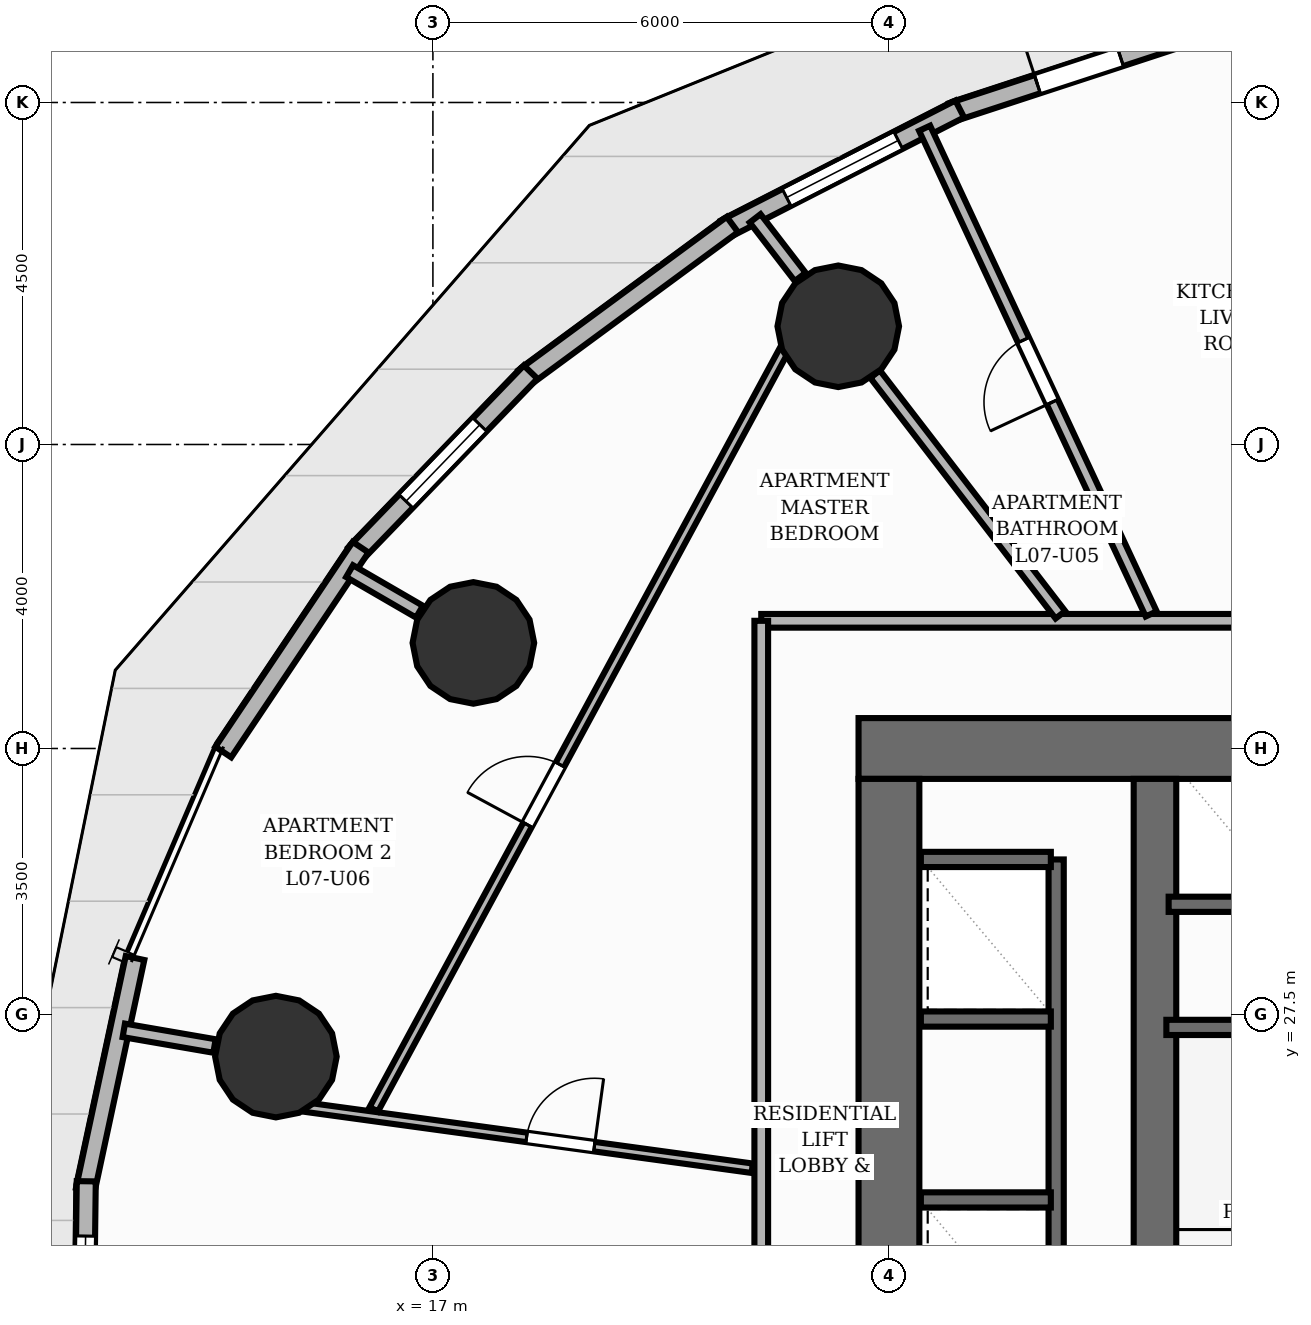
"""IFC4 building model, lengths in metres.
Left out: names, types, materials, properties, quantities, classifications, styles, units other than length and angle.
Written with IfcOpenShell. Run it as: python <this file> out.ifc"""

import sys

from ifc_helpers import new_model, si_unit, direction, frame, frame_2d, origin, origin_2d, place, context, subcontext, project, spatial, rectangle, circle, extrude, element, fill, save


model = new_model("IFC4")
c1 = context("Model", 3, precision=1e-05, world=origin(), true_north=direction((0.0, 1.0)))
c2 = subcontext(c1, "Body", "Model", "MODEL_VIEW")
j1 = project(units=[si_unit("LENGTHUNIT", "METRE"), si_unit("PLANEANGLEUNIT", "RADIAN")], contexts=[c1])
p1 = place(None, origin())
s1 = spatial("IfcSite", under=j1, at=p1, CompositionType="ELEMENT")
p2 = place(p1, origin())
s2 = spatial("IfcBuilding", under=s1, at=p2, CompositionType="ELEMENT")
p3 = place(p2, frame((0.0, 0.0, 28.0)))
s3 = spatial("IfcBuildingStorey", under=s2, at=p3, CompositionType="ELEMENT", Elevation=28.0)
p4 = place(p3, frame((22.6, 31.0, 0.0), z_axis=(0.0, 0.0, 1.0), x_axis=(1.0, 0.0, 0.0)))
e1 = element("IfcWall", 1, at=p4, inside=s3, PredefinedType="SHEAR", context=c2, shape_type="SweptSolid", body=[
    extrude(rectangle(XDim=18.8, YDim=0.8, at=frame_2d((9.4, 0.0))), origin(), (0.0, 0.0, 1.0), 3.2),
])
p5 = place(p4, frame((11.8, 0.0, 0.0)))
e2 = element("IfcOpeningElement", 2, at=p5, cuts=e1, PredefinedType="OPENING", context=c2, shape_type="SweptSolid", body=[
    extrude(rectangle(XDim=1.1, YDim=2.15, at=frame_2d((0.55, 1.075))), frame((0.0, 0.41, 0.0), z_axis=(0.0, -1.0, 0.0), x_axis=(1.0, 0.0, 0.0)), (0.0, 0.0, 1.0), 0.82),
])
p6 = place(p3, frame((23.0, 17.4, 0.0), z_axis=(0.0, 0.0, 1.0), x_axis=(0.0, 1.0, 0.0)))
e3 = element("IfcWall", 3, at=p6, inside=s3, PredefinedType="SHEAR", context=c2, shape_type="SweptSolid", body=[
    extrude(rectangle(XDim=13.2, YDim=0.8, at=frame_2d((6.6, 0.0))), origin(), (0.0, 0.0, 1.0), 3.2),
])
p7 = place(p3, frame((26.5, 17.4, 0.0), z_axis=(0.0, 0.0, 1.0), x_axis=(0.0, 1.0, 0.0)))
e4 = element("IfcWall", 4, at=p7, inside=s3, PredefinedType="SHEAR", context=c2, shape_type="SweptSolid", body=[
    extrude(rectangle(XDim=13.2, YDim=0.56, at=frame_2d((6.6, 0.0))), origin(), (0.0, 0.0, 1.0), 3.2),
])
for number, where, z_axis, x_axis in (
    (5, (22.333, 36.555, 0.0), (0.0, 0.0, 1.0), (1.0, 0.0, 0.0)),
    (6, (17.532, 32.389, 0.0), (0.0, 0.0, 1.0), (1.0, 0.0, 0.0)),
    (7, (14.934, 26.946, 0.0), (0.0, 0.0, 1.0), (1.0, 0.0, 0.0)),
):
    element("IfcColumn", number, at=place(p3, frame(where, z_axis=z_axis, x_axis=x_axis)), inside=s3, PredefinedType="COLUMN", context=c2, shape_type="SweptSolid", body=[
        extrude(circle(Radius=0.8, at=origin_2d()), origin(), (0.0, 0.0, 1.0), 3.2),
    ])
p8 = place(p3, frame((23.831, 39.373, 0.0), z_axis=(0.0, 0.0, 1.0), x_axis=(0.950290237418, 0.311365484066, 0.0)))
e8 = element("IfcWall", 8, at=p8, inside=s3, PredefinedType="SOLIDWALL", context=c2, shape_type="SweptSolid", body=[
    extrude(rectangle(XDim=3.513, YDim=0.25, at=frame_2d((1.756, 0.0))), origin(), (0.0, 0.0, 1.0), 2.96),
])
p9 = place(p8, frame((1.181, 0.0, 0.0)))
e9 = element("IfcOpeningElement", 9, at=p9, cuts=e8, PredefinedType="OPENING", context=c2, shape_type="SweptSolid", body=[
    extrude(rectangle(XDim=1.15, YDim=2.2, at=frame_2d((0.575, 1.1))), frame((0.0, 0.135, 0.0), z_axis=(0.0, -1.0, 0.0), x_axis=(1.0, 0.0, 0.0)), (0.0, 0.0, 1.0), 0.27),
])
p10 = place(p3, frame((20.847, 37.836, 0.0), z_axis=(0.0, 0.0, 1.0), x_axis=(0.890260122421, 0.455452428281, 0.0)))
e10 = element("IfcWall", 10, at=p10, inside=s3, PredefinedType="SOLIDWALL", context=c2, shape_type="SweptSolid", body=[
    extrude(rectangle(XDim=3.465, YDim=0.25, at=frame_2d((1.732, 0.0))), origin(), (0.0, 0.0, 1.0), 2.96),
])
p11 = place(p10, frame((0.907, 0.0, 0.85)))
e11 = element("IfcOpeningElement", 11, at=p11, cuts=e10, PredefinedType="OPENING", context=c2, shape_type="SweptSolid", body=[
    extrude(rectangle(XDim=1.65, YDim=1.55, at=frame_2d((0.825, 0.775))), frame((0.0, 0.135, 0.0), z_axis=(0.0, -1.0, 0.0), x_axis=(1.0, 0.0, 0.0)), (0.0, 0.0, 1.0), 0.27),
])
p12 = place(p3, frame((18.202, 35.88, 0.0), z_axis=(0.0, 0.0, 1.0), x_axis=(0.805405938507, 0.592723606935, 0.0)))
e12 = element("IfcWall", 12, at=p12, inside=s3, PredefinedType="SOLIDWALL", context=c2, shape_type="SweptSolid", body=[
    extrude(rectangle(XDim=3.399, YDim=0.25, at=frame_2d((1.699, 0.0))), origin(), (0.0, 0.0, 1.0), 2.96),
])
p13 = place(p3, frame((15.979, 33.562, 0.0), z_axis=(0.0, 0.0, 1.0), x_axis=(0.694392538781, 0.719596416115, 0.0)))
e13 = element("IfcWall", 13, at=p13, inside=s3, PredefinedType="SOLIDWALL", context=c2, shape_type="SweptSolid", body=[
    extrude(rectangle(XDim=3.323, YDim=0.25, at=frame_2d((1.661, 0.0))), origin(), (0.0, 0.0, 1.0), 2.96),
])
p14 = place(p13, frame((0.961, 0.0, 0.85)))
e14 = element("IfcOpeningElement", 14, at=p14, cuts=e13, PredefinedType="OPENING", context=c2, shape_type="SweptSolid", body=[
    extrude(rectangle(XDim=1.4, YDim=1.55, at=frame_2d((0.7, 0.775))), frame((0.0, 0.135, 0.0), z_axis=(0.0, -1.0, 0.0), x_axis=(1.0, 0.0, 0.0)), (0.0, 0.0, 1.0), 0.27),
])
p15 = place(p3, frame((14.242, 30.953, 0.0), z_axis=(0.0, 0.0, 1.0), x_axis=(0.556764929833, 0.83067009872, 0.0)))
e15 = element("IfcWall", 15, at=p15, inside=s3, PredefinedType="SOLIDWALL", context=c2, shape_type="SweptSolid", body=[
    extrude(rectangle(XDim=3.244, YDim=0.25, at=frame_2d((1.622, 0.0))), origin(), (0.0, 0.0, 1.0), 2.96),
])
p16 = place(p3, frame((12.427, 25.192, 0.0), z_axis=(0.0, 0.0, 1.0), x_axis=(0.209668000253, 0.977772637002, 0.0)))
e16 = element("IfcWall", 16, at=p16, inside=s3, PredefinedType="SOLIDWALL", context=c2, shape_type="SweptSolid", body=[
    extrude(rectangle(XDim=3.121, YDim=0.25, at=frame_2d((1.56, 0.0))), origin(), (0.0, 0.0, 1.0), 2.96),
])
p17 = place(p3, frame((12.401, 22.214, 0.0), z_axis=(0.0, 0.0, 1.0), x_axis=(0.012397373015, 0.999923149618, 0.0)))
e17 = element("IfcWall", 17, at=p17, inside=s3, PredefinedType="SOLIDWALL", context=c2, shape_type="SweptSolid", body=[
    extrude(rectangle(XDim=3.092, YDim=0.25, at=frame_2d((1.546, 0.0))), origin(), (0.0, 0.0, 1.0), 2.96),
])
p18 = place(p17, frame((0.721, 0.0, 0.85)))
e18 = element("IfcOpeningElement", 18, at=p18, cuts=e17, PredefinedType="OPENING", context=c2, shape_type="SweptSolid", body=[
    extrude(rectangle(XDim=1.65, YDim=1.55, at=frame_2d((0.825, 0.775))), frame((0.0, 0.135, 0.0), z_axis=(0.0, -1.0, 0.0), x_axis=(1.0, 0.0, 0.0)), (0.0, 0.0, 1.0), 0.27),
])
p19 = place(p3, frame((26.65, 27.33, 0.0), z_axis=(0.0, 0.0, 1.0), x_axis=(1.0, 0.0, 0.0)))
e19 = element("IfcWall", 19, at=p19, inside=s3, PredefinedType="SHEAR", context=c2, shape_type="SweptSolid", body=[
    extrude(rectangle(XDim=3.24, YDim=0.2, at=frame_2d((1.62, 0.0))), origin(), (0.0, 0.0, 1.0), 3.2),
])
p20 = place(p3, frame((25.2, 18.46, 0.0), z_axis=(0.0, 0.0, 1.0), x_axis=(0.0, 1.0, 0.0)))
e20 = element("IfcWall", 20, at=p20, inside=s3, PredefinedType="SHEAR", context=c2, shape_type="SweptSolid", body=[
    extrude(rectangle(XDim=11.08, YDim=0.2, at=frame_2d((5.54, 0.0))), origin(), (0.0, 0.0, 1.0), 3.2),
])
for number, where, z_axis, x_axis in (
    (21, (23.42, 29.54, 0.0), (0.0, 0.0, 1.0), (1.0, 0.0, 0.0)),
    (22, (23.42, 25.06, 0.0), (0.0, 0.0, 1.0), (1.0, 0.0, 0.0)),
    (23, (23.42, 27.44, 0.0), (0.0, 0.0, 1.0), (1.0, 0.0, 0.0)),
):
    element("IfcWall", number, at=place(p3, frame(where, z_axis=z_axis, x_axis=x_axis)), inside=s3, PredefinedType="SHEAR", context=c2, shape_type="SweptSolid", body=[
        extrude(rectangle(XDim=1.71, YDim=0.2, at=frame_2d((0.855, 0.0))), origin(), (0.0, 0.0, 1.0), 3.2),
    ])
p21 = place(p3, frame((26.68, 28.95, 0.0), z_axis=(0.0, 0.0, 1.0), x_axis=(1.0, 0.0, 0.0)))
e24 = element("IfcWall", 24, at=p21, inside=s3, PredefinedType="SHEAR", context=c2, shape_type="SweptSolid", body=[
    extrude(rectangle(XDim=5.24, YDim=0.2, at=frame_2d((2.62, 0.0))), origin(), (0.0, 0.0, 1.0), 3.2),
])
p22 = place(p3, frame((21.833, 37.205, 0.0), z_axis=(0.0, 0.0, 1.0), x_axis=(-0.609953343804, 0.792437327732, 0.0)))
e25 = element("IfcWall", 25, at=p22, inside=s3, PredefinedType="PARTITIONING", context=c2, shape_type="SweptSolid", body=[
    extrude(rectangle(XDim=0.973, YDim=0.18, at=frame_2d((0.486, 0.0))), origin(), (0.0, 0.0, 1.0), 2.178),
])
p23 = place(p3, frame((16.823, 32.8, 0.0), z_axis=(0.0, 0.0, 1.0), x_axis=(-0.865001274409, 0.501769663562, 0.0)))
e26 = element("IfcWall", 26, at=p23, inside=s3, PredefinedType="PARTITIONING", context=c2, shape_type="SweptSolid", body=[
    extrude(rectangle(XDim=1.063, YDim=0.18, at=frame_2d((0.531, 0.0))), origin(), (0.0, 0.0, 1.0), 2.178),
])
p24 = place(p3, frame((14.126, 27.085, 0.0), z_axis=(0.0, 0.0, 1.0), x_axis=(-0.985412344637, 0.170183756676, 0.0)))
e27 = element("IfcWall", 27, at=p24, inside=s3, PredefinedType="PARTITIONING", context=c2, shape_type="SweptSolid", body=[
    extrude(rectangle(XDim=1.211, YDim=0.18, at=frame_2d((0.605, 0.0))), origin(), (0.0, 0.0, 1.0), 2.178),
])
p25 = place(p3, frame((21.32, 32.68, 0.0), z_axis=(0.0, 0.0, 1.0), x_axis=(1.0, 0.0, 0.0)))
e28 = element("IfcWall", 28, at=p25, inside=s3, PredefinedType="PARTITIONING", context=c2, shape_type="SweptSolid", body=[
    extrude(rectangle(XDim=8.823, YDim=0.18, at=frame_2d((4.411, 0.0))), origin(), (0.0, 0.0, 1.0), 2.955),
])
p26 = place(p25, frame((6.462, 0.0, 0.0)))
e29 = element("IfcOpeningElement", 29, at=p26, cuts=e28, PredefinedType="OPENING", context=c2, shape_type="SweptSolid", body=[
    extrude(rectangle(XDim=1.05, YDim=2.15, at=frame_2d((0.525, 1.075))), frame((0.0, 0.1, 0.0), z_axis=(0.0, -1.0, 0.0), x_axis=(1.0, 0.0, 0.0)), (0.0, 0.0, 1.0), 0.2),
])
p27 = place(p3, frame((21.32, 22.09, 0.0), z_axis=(0.0, 0.0, 1.0), x_axis=(0.0, 1.0, 0.0)))
e30 = element("IfcWall", 30, at=p27, inside=s3, PredefinedType="PARTITIONING", context=c2, shape_type="SweptSolid", body=[
    extrude(rectangle(XDim=10.59, YDim=0.18, at=frame_2d((5.295, 0.0))), origin(), (0.0, 0.0, 1.0), 2.955),
])
p28 = place(p27, frame((1.17, 0.0, 0.0)))
e31 = element("IfcOpeningElement", 31, at=p28, cuts=e30, PredefinedType="OPENING", context=c2, shape_type="SweptSolid", body=[
    extrude(rectangle(XDim=1.05, YDim=2.15, at=frame_2d((0.525, 1.075))), frame((0.0, 0.1, 0.0), z_axis=(0.0, -1.0, 0.0), x_axis=(1.0, 0.0, 0.0)), (0.0, 0.0, 1.0), 0.2),
])
p29 = place(p3, frame((26.45, 32.771, 0.0), z_axis=(0.0, 0.0, 1.0), x_axis=(-0.422745211231, 0.906248578692, 0.0)))
e32 = element("IfcWall", 32, at=p29, inside=s3, PredefinedType="PLUMBINGWALL", context=c2, shape_type="SweptSolid", body=[
    extrude(rectangle(XDim=7.052, YDim=0.16, at=frame_2d((3.526, 0.0))), origin(), (0.0, 0.0, 1.0), 2.641),
])
p30 = place(p29, frame((3.076, 0.0, 0.0)))
e33 = element("IfcOpeningElement", 33, at=p30, cuts=e32, PredefinedType="OPENING", context=c2, shape_type="SweptSolid", body=[
    extrude(rectangle(XDim=0.9, YDim=2.1, at=frame_2d((0.45, 1.05))), frame((0.0, 0.09, 0.0), z_axis=(0.0, -1.0, 0.0), x_axis=(1.0, 0.0, 0.0)), (0.0, 0.0, 1.0), 0.18),
])
p31 = place(p3, frame((25.256, 32.759, 0.0), z_axis=(0.0, 0.0, 1.0), x_axis=(-0.610097434882, 0.792326397358, 0.0)))
e34 = element("IfcWall", 34, at=p31, inside=s3, PredefinedType="PLUMBINGWALL", context=c2, shape_type="SweptSolid", body=[
    extrude(rectangle(XDim=3.997, YDim=0.16, at=frame_2d((1.998, 0.0))), origin(), (0.0, 0.0, 1.0), 2.178),
])
p32 = place(p3, frame((15.33, 26.28, 0.0), z_axis=(0.0, 0.0, 1.0), x_axis=(0.990775681502, -0.135512172681, 0.0)))
e35 = element("IfcWall", 35, at=p32, inside=s3, PredefinedType="PARTITIONING", context=c2, shape_type="SweptSolid", body=[
    extrude(rectangle(XDim=5.926, YDim=0.125, at=frame_2d((2.963, 0.0))), origin(), (0.0, 0.0, 1.0), 2.955),
])
p33 = place(p32, frame((2.929, 0.0, 0.0)))
e36 = element("IfcOpeningElement", 36, at=p33, cuts=e35, PredefinedType="OPENING", context=c2, shape_type="SweptSolid", body=[
    extrude(rectangle(XDim=0.9, YDim=2.1, at=frame_2d((0.45, 1.05))), frame((0.0, 0.073, 0.0), z_axis=(0.0, -1.0, 0.0), x_axis=(1.0, 0.0, 0.0)), (0.0, 0.0, 1.0), 0.145),
])
p34 = place(p3, frame((16.222, 26.252, 0.0), z_axis=(0.0, 0.0, 1.0), x_axis=(0.475374660533, 0.879783457519, 0.0)))
e37 = element("IfcWall", 37, at=p34, inside=s3, PredefinedType="PARTITIONING", context=c2, shape_type="SweptSolid", body=[
    extrude(rectangle(XDim=11.37, YDim=0.125, at=frame_2d((5.685, 0.0))), origin(), (0.0, 0.0, 1.0), 2.328),
])
p35 = place(p34, frame((4.255, 0.0, 0.0)))
e38 = element("IfcOpeningElement", 38, at=p35, cuts=e37, PredefinedType="OPENING", context=c2, shape_type="SweptSolid", body=[
    extrude(rectangle(XDim=0.9, YDim=2.1, at=frame_2d((0.45, 1.05))), frame((0.0, 0.073, 0.0), z_axis=(0.0, -1.0, 0.0), x_axis=(1.0, 0.0, 0.0)), (0.0, 0.0, 1.0), 0.145),
])
p36 = place(p9, origin())
e39 = element("IfcDoor", 39, at=p36, inside=s3, OperationType="SINGLE_SWING_LEFT", PredefinedType="DOOR", context=c2, shape_type="SweptSolid", body=[
    extrude(rectangle(XDim=1.15, YDim=2.2, at=frame_2d((0.575, 1.1))), frame((0.0, 0.025, 0.0), z_axis=(0.0, -1.0, 0.0), x_axis=(1.0, 0.0, 0.0)), (0.0, 0.0, 1.0), 0.05),
])
fill(e9, e39)
p37 = place(p11, origin())
e40 = element("IfcWindow", 40, at=p37, inside=s3, PartitioningType="SINGLE_PANEL", PredefinedType="WINDOW", context=c2, shape_type="SweptSolid", body=[
    extrude(rectangle(XDim=1.65, YDim=1.55, at=frame_2d((0.825, 0.775))), frame((0.0, 0.03, 0.0), z_axis=(0.0, -1.0, 0.0), x_axis=(1.0, 0.0, 0.0)), (0.0, 0.0, 1.0), 0.06),
])
fill(e11, e40)
p38 = place(p14, origin())
e41 = element("IfcWindow", 41, at=p38, inside=s3, PartitioningType="SINGLE_PANEL", PredefinedType="WINDOW", context=c2, shape_type="SweptSolid", body=[
    extrude(rectangle(XDim=1.4, YDim=1.55, at=frame_2d((0.7, 0.775))), frame((0.0, 0.03, 0.0), z_axis=(0.0, -1.0, 0.0), x_axis=(1.0, 0.0, 0.0)), (0.0, 0.0, 1.0), 0.06),
])
fill(e14, e41)
p39 = place(p18, origin())
e42 = element("IfcWindow", 42, at=p39, inside=s3, PartitioningType="SINGLE_PANEL", PredefinedType="WINDOW", context=c2, shape_type="SweptSolid", body=[
    extrude(rectangle(XDim=1.65, YDim=1.55, at=frame_2d((0.825, 0.775))), frame((0.0, 0.03, 0.0), z_axis=(0.0, -1.0, 0.0), x_axis=(1.0, 0.0, 0.0)), (0.0, 0.0, 1.0), 0.06),
])
fill(e18, e42)
p40 = place(p30, origin())
e43 = element("IfcDoor", 43, at=p40, inside=s3, OperationType="SINGLE_SWING_LEFT", PredefinedType="DOOR", context=c2, shape_type="SweptSolid", body=[
    extrude(rectangle(XDim=0.9, YDim=2.1, at=frame_2d((0.45, 1.05))), frame((0.0, 0.025, 0.0), z_axis=(0.0, -1.0, 0.0), x_axis=(1.0, 0.0, 0.0)), (0.0, 0.0, 1.0), 0.05),
])
fill(e33, e43)
p41 = place(p33, origin())
e44 = element("IfcDoor", 44, at=p41, inside=s3, OperationType="SINGLE_SWING_RIGHT", PredefinedType="DOOR", context=c2, shape_type="SweptSolid", body=[
    extrude(rectangle(XDim=0.9, YDim=2.1, at=frame_2d((0.45, 1.05))), frame((0.0, 0.025, 0.0), z_axis=(0.0, -1.0, 0.0), x_axis=(1.0, 0.0, 0.0)), (0.0, 0.0, 1.0), 0.05),
])
fill(e36, e44)
p42 = place(p35, origin())
e45 = element("IfcDoor", 45, at=p42, inside=s3, OperationType="SINGLE_SWING_LEFT", PredefinedType="DOOR", context=c2, shape_type="SweptSolid", body=[
    extrude(rectangle(XDim=0.9, YDim=2.1, at=frame_2d((0.45, 1.05))), frame((0.0, 0.025, 0.0), z_axis=(0.0, -1.0, 0.0), x_axis=(1.0, 0.0, 0.0)), (0.0, 0.0, 1.0), 0.05),
])
fill(e38, e45)
save(model, sys.argv[1])
